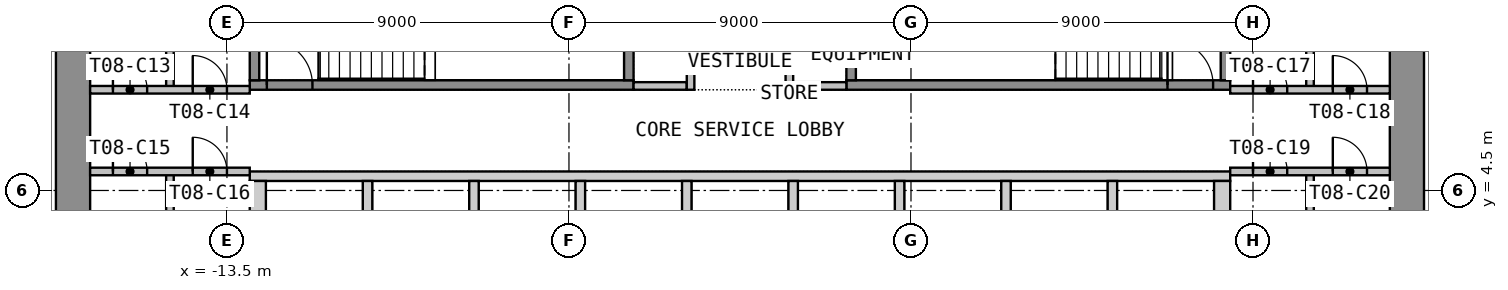
"""IFC4 building model, lengths in metres.
Left out: names, types, materials, properties, quantities, classifications, styles, units other than length and angle.
Written with IfcOpenShell. Run it as: python <this file> out.ifc"""

import sys

from ifc_helpers import new_model, si_unit, direction, frame, frame_2d, origin, place, context, subcontext, project, spatial, polyline, rectangle, outline, extrude, element, fill, save


model = new_model("IFC4")
c1 = context("Model", 3, precision=1e-05, world=origin(), true_north=direction((0.0, 1.0)))
c2 = subcontext(c1, "Body", "Model", "MODEL_VIEW")
j1 = project(units=[si_unit("LENGTHUNIT", "METRE"), si_unit("PLANEANGLEUNIT", "RADIAN")], contexts=[c1])
p1 = place(None, origin())
s1 = spatial("IfcSite", under=j1, at=p1, CompositionType="ELEMENT")
p2 = place(p1, origin())
s2 = spatial("IfcBuilding", under=s1, at=p2, CompositionType="ELEMENT")
p3 = place(p2, frame((0.0, 0.0, 116.4)))
s3 = spatial("IfcBuildingStorey", under=s2, at=p3, CompositionType="ELEMENT", Elevation=116.4)
p4 = place(p3, frame((-17.55, -12.6, 0.0), z_axis=(0.0, 0.0, 1.0), x_axis=(0.0, 1.0, 0.0)))
e1 = element("IfcWall", 1, at=p4, inside=s3, PredefinedType="SHEAR", context=c2, shape_type="SweptSolid", body=[
    extrude(rectangle(XDim=25.2, YDim=0.9, at=frame_2d((12.6, 0.0))), origin(), (0.0, 0.0, 1.0), 3.525),
])
p5 = place(p4, frame((11.4, 0.0, 0.0)))
e2 = element("IfcOpeningElement", 2, at=p5, cuts=e1, PredefinedType="OPENING", context=c2, shape_type="SweptSolid", body=[
    extrude(rectangle(XDim=2.4, YDim=2.1, at=frame_2d((1.2, 1.05))), frame((0.0, 0.46, 0.0), z_axis=(0.0, -1.0, 0.0), x_axis=(1.0, 0.0, 0.0)), (0.0, 0.0, 1.0), 0.92),
])
p6 = place(p3, frame((17.55, -12.6, 0.0), z_axis=(0.0, 0.0, 1.0), x_axis=(0.0, 1.0, 0.0)))
e3 = element("IfcWall", 3, at=p6, inside=s3, PredefinedType="SHEAR", context=c2, shape_type="SweptSolid", body=[
    extrude(rectangle(XDim=25.2, YDim=0.9, at=frame_2d((12.6, 0.0))), origin(), (0.0, 0.0, 1.0), 3.525),
])
p7 = place(p6, frame((11.4, 0.0, 0.0)))
e4 = element("IfcOpeningElement", 4, at=p7, cuts=e3, PredefinedType="OPENING", context=c2, shape_type="SweptSolid", body=[
    extrude(rectangle(XDim=2.4, YDim=2.1, at=frame_2d((1.2, 1.05))), frame((0.0, 0.46, 0.0), z_axis=(0.0, -1.0, 0.0), x_axis=(1.0, 0.0, 0.0)), (0.0, 0.0, 1.0), 0.92),
])
p8 = place(p3, origin())
e5 = element("IfcWall", 5, at=p8, inside=s3, PredefinedType="SHEAR", context=c2, shape_type="SweptSolid", body=[
    extrude(outline(polyline([(-12.9, 4.75), (12.9, 4.75), (12.9, 5.0), (-12.9, 5.0), (-12.9, 4.75)])), origin(), (0.0, 0.0, 1.0), 3.525),
])
p9 = place(p3, origin())
e6 = element("IfcWall", 6, at=p9, inside=s3, PredefinedType="SHEAR", context=c2, shape_type="SweptSolid", body=[
    extrude(outline(polyline([(-12.9, 2.05), (-12.475, 2.05), (-12.475, 4.75), (-12.9, 4.75), (-12.9, 2.05)])), origin(), (0.0, 0.0, 1.0), 3.525),
])
p10 = place(p3, origin())
e7 = element("IfcWall", 7, at=p10, inside=s3, PredefinedType="SHEAR", context=c2, shape_type="SweptSolid", body=[
    extrude(outline(polyline([(-9.925, 2.05), (-9.675, 2.05), (-9.675, 4.75), (-9.925, 4.75), (-9.925, 2.05)])), origin(), (0.0, 0.0, 1.0), 3.525),
])
p11 = place(p3, origin())
e8 = element("IfcWall", 8, at=p11, inside=s3, PredefinedType="SHEAR", context=c2, shape_type="SweptSolid", body=[
    extrude(outline(polyline([(-7.125, 2.05), (-6.875, 2.05), (-6.875, 4.75), (-7.125, 4.75), (-7.125, 2.05)])), origin(), (0.0, 0.0, 1.0), 3.525),
])
p12 = place(p3, origin())
e9 = element("IfcWall", 9, at=p12, inside=s3, PredefinedType="SHEAR", context=c2, shape_type="SweptSolid", body=[
    extrude(outline(polyline([(-4.325, 2.05), (-4.075, 2.05), (-4.075, 4.75), (-4.325, 4.75), (-4.325, 2.05)])), origin(), (0.0, 0.0, 1.0), 3.525),
])
p13 = place(p3, origin())
e10 = element("IfcWall", 10, at=p13, inside=s3, PredefinedType="SHEAR", context=c2, shape_type="SweptSolid", body=[
    extrude(outline(polyline([(-1.525, 2.05), (-1.275, 2.05), (-1.275, 4.75), (-1.525, 4.75), (-1.525, 2.05)])), origin(), (0.0, 0.0, 1.0), 3.525),
])
p14 = place(p3, origin())
e11 = element("IfcWall", 11, at=p14, inside=s3, PredefinedType="SHEAR", context=c2, shape_type="SweptSolid", body=[
    extrude(outline(polyline([(1.275, 2.05), (1.525, 2.05), (1.525, 4.75), (1.275, 4.75), (1.275, 2.05)])), origin(), (0.0, 0.0, 1.0), 3.525),
])
p15 = place(p3, origin())
e12 = element("IfcWall", 12, at=p15, inside=s3, PredefinedType="SHEAR", context=c2, shape_type="SweptSolid", body=[
    extrude(outline(polyline([(4.075, 2.05), (4.325, 2.05), (4.325, 4.75), (4.075, 4.75), (4.075, 2.05)])), origin(), (0.0, 0.0, 1.0), 3.525),
])
p16 = place(p3, origin())
e13 = element("IfcWall", 13, at=p16, inside=s3, PredefinedType="SHEAR", context=c2, shape_type="SweptSolid", body=[
    extrude(outline(polyline([(6.875, 2.05), (7.125, 2.05), (7.125, 4.75), (6.875, 4.75), (6.875, 2.05)])), origin(), (0.0, 0.0, 1.0), 3.525),
])
p17 = place(p3, origin())
e14 = element("IfcWall", 14, at=p17, inside=s3, PredefinedType="SHEAR", context=c2, shape_type="SweptSolid", body=[
    extrude(outline(polyline([(9.675, 2.05), (9.925, 2.05), (9.925, 4.75), (9.675, 4.75), (9.675, 2.05)])), origin(), (0.0, 0.0, 1.0), 3.525),
])
p18 = place(p3, origin())
e15 = element("IfcWall", 15, at=p18, inside=s3, PredefinedType="SHEAR", context=c2, shape_type="SweptSolid", body=[
    extrude(outline(polyline([(12.475, 2.05), (12.9, 2.05), (12.9, 4.75), (12.475, 4.75), (12.475, 2.05)])), origin(), (0.0, 0.0, 1.0), 3.525),
])
p19 = place(p3, frame((-12.9, 7.275, 0.0), z_axis=(0.0, 0.0, 1.0), x_axis=(1.0, 0.0, 0.0)))
e16 = element("IfcWall", 16, at=p19, inside=s3, PredefinedType="SHEAR", context=c2, shape_type="SweptSolid", body=[
    extrude(rectangle(XDim=10.1, YDim=0.25, at=frame_2d((5.05, 0.0))), origin(), (0.0, 0.0, 1.0), 3.525),
])
p20 = place(p19, frame((0.45, 0.0, 0.0)))
e17 = element("IfcOpeningElement", 17, at=p20, cuts=e16, PredefinedType="OPENING", context=c2, shape_type="SweptSolid", body=[
    extrude(rectangle(XDim=1.2, YDim=2.1, at=frame_2d((0.6, 1.05))), frame((0.0, 0.135, 0.0), z_axis=(0.0, -1.0, 0.0), x_axis=(1.0, 0.0, 0.0)), (0.0, 0.0, 1.0), 0.27),
])
for number, where, z_axis, x_axis in (
    (18, (-12.775, 7.4, 0.0), (0.0, 0.0, 1.0), (0.0, 1.0, 0.0)),
    (19, (-2.925, 7.4, 0.0), (0.0, 0.0, 1.0), (0.0, 1.0, 0.0)),
):
    element("IfcWall", number, at=place(p3, frame(where, z_axis=z_axis, x_axis=x_axis)), inside=s3, PredefinedType="SHEAR", context=c2, shape_type="SweptSolid", body=[
        extrude(rectangle(XDim=3.25, YDim=0.25, at=frame_2d((1.625, 0.0))), origin(), (0.0, 0.0, 1.0), 3.525),
    ])
p21 = place(p3, frame((2.8, 7.275, 0.0), z_axis=(0.0, 0.0, 1.0), x_axis=(1.0, 0.0, 0.0)))
e20 = element("IfcWall", 20, at=p21, inside=s3, PredefinedType="SHEAR", context=c2, shape_type="SweptSolid", body=[
    extrude(rectangle(XDim=10.1, YDim=0.25, at=frame_2d((5.05, 0.0))), origin(), (0.0, 0.0, 1.0), 3.525),
])
p22 = place(p21, frame((8.45, 0.0, 0.0)))
e21 = element("IfcOpeningElement", 21, at=p22, cuts=e20, PredefinedType="OPENING", context=c2, shape_type="SweptSolid", body=[
    extrude(rectangle(XDim=1.2, YDim=2.1, at=frame_2d((0.6, 1.05))), frame((0.0, 0.135, 0.0), z_axis=(0.0, -1.0, 0.0), x_axis=(1.0, 0.0, 0.0)), (0.0, 0.0, 1.0), 0.27),
])
for number, where, z_axis, x_axis in (
    (22, (2.925, 7.4, 0.0), (0.0, 0.0, 1.0), (0.0, 1.0, 0.0)),
    (23, (12.775, 7.4, 0.0), (0.0, 0.0, 1.0), (0.0, 1.0, 0.0)),
):
    element("IfcWall", number, at=place(p3, frame(where, z_axis=z_axis, x_axis=x_axis)), inside=s3, PredefinedType="SHEAR", context=c2, shape_type="SweptSolid", body=[
        extrude(rectangle(XDim=3.25, YDim=0.25, at=frame_2d((1.625, 0.0))), origin(), (0.0, 0.0, 1.0), 3.525),
    ])
for number, where, z_axis, x_axis in (
    (24, (-2.8, 7.25, 0.0), (0.0, 0.0, 1.0), (1.0, 0.0, 0.0)),
    (25, (1.4, 7.25, 0.0), (0.0, 0.0, 1.0), (1.0, 0.0, 0.0)),
):
    element("IfcWall", number, at=place(p3, frame(where, z_axis=z_axis, x_axis=x_axis)), inside=s3, PredefinedType="PARTITIONING", context=c2, shape_type="SweptSolid", body=[
        extrude(rectangle(XDim=1.4, YDim=0.2, at=frame_2d((0.7, 0.0))), origin(), (0.0, 0.0, 1.0), 3.525),
    ])
p23 = place(p3, frame((-1.3, 7.15, 0.0), z_axis=(0.0, 0.0, 1.0), x_axis=(0.0, 1.0, 0.0)))
e26 = element("IfcWall", 26, at=p23, inside=s3, PredefinedType="PARTITIONING", context=c2, shape_type="SweptSolid", body=[
    extrude(rectangle(XDim=5.45, YDim=0.2, at=frame_2d((2.725, 0.0))), origin(), (0.0, 0.0, 1.0), 3.525),
])
p24 = place(p23, frame((2.375, 0.0, 0.0)))
e27 = element("IfcOpeningElement", 27, at=p24, cuts=e26, PredefinedType="OPENING", context=c2, shape_type="SweptSolid", body=[
    extrude(rectangle(XDim=0.9, YDim=2.1, at=frame_2d((0.45, 1.05))), frame((0.0, 0.11, 0.0), z_axis=(0.0, -1.0, 0.0), x_axis=(1.0, 0.0, 0.0)), (0.0, 0.0, 1.0), 0.22),
])
p25 = place(p3, frame((1.3, 7.15, 0.0), z_axis=(0.0, 0.0, 1.0), x_axis=(0.0, 1.0, 0.0)))
e28 = element("IfcWall", 28, at=p25, inside=s3, PredefinedType="PARTITIONING", context=c2, shape_type="SweptSolid", body=[
    extrude(rectangle(XDim=5.45, YDim=0.2, at=frame_2d((2.725, 0.0))), origin(), (0.0, 0.0, 1.0), 3.525),
])
p26 = place(p25, frame((1.587, 0.0, 0.0)))
e29 = element("IfcOpeningElement", 29, at=p26, cuts=e28, PredefinedType="OPENING", context=c2, shape_type="SweptSolid", body=[
    extrude(rectangle(XDim=0.9, YDim=2.1, at=frame_2d((0.45, 1.05))), frame((0.0, 0.11, 0.0), z_axis=(0.0, -1.0, 0.0), x_axis=(1.0, 0.0, 0.0)), (0.0, 0.0, 1.0), 0.22),
])
p27 = place(p25, frame((4.212, 0.0, 0.0)))
e30 = element("IfcOpeningElement", 30, at=p27, cuts=e28, PredefinedType="OPENING", context=c2, shape_type="SweptSolid", body=[
    extrude(rectangle(XDim=0.9, YDim=2.1, at=frame_2d((0.45, 1.05))), frame((0.0, 0.11, 0.0), z_axis=(0.0, -1.0, 0.0), x_axis=(1.0, 0.0, 0.0)), (0.0, 0.0, 1.0), 0.22),
])
p28 = place(p3, frame((-15.0, 7.15, 0.0), z_axis=(0.0, 0.0, 1.0), x_axis=(0.0, 1.0, 0.0)))
e31 = element("IfcWall", 31, at=p28, inside=s3, PredefinedType="PARTITIONING", context=c2, shape_type="SweptSolid", body=[
    extrude(rectangle(XDim=5.45, YDim=0.2, at=frame_2d((2.725, 0.0))), origin(), (0.0, 0.0, 1.0), 3.525),
])
p29 = place(p3, frame((-17.1, 7.15, 0.0), z_axis=(0.0, 0.0, 1.0), x_axis=(1.0, 0.0, 0.0)))
e32 = element("IfcWall", 32, at=p29, inside=s3, PredefinedType="PARTITIONING", context=c2, shape_type="SweptSolid", body=[
    extrude(rectangle(XDim=4.2, YDim=0.2, at=frame_2d((2.1, 0.0))), origin(), (0.0, 0.0, 1.0), 3.525),
])
p30 = place(p29, frame((0.6, 0.0, 0.0)))
e33 = element("IfcOpeningElement", 33, at=p30, cuts=e32, PredefinedType="OPENING", context=c2, shape_type="SweptSolid", body=[
    extrude(rectangle(XDim=0.9, YDim=2.1, at=frame_2d((0.45, 1.05))), frame((0.0, 0.11, 0.0), z_axis=(0.0, -1.0, 0.0), x_axis=(1.0, 0.0, 0.0)), (0.0, 0.0, 1.0), 0.22),
])
p31 = place(p29, frame((2.7, 0.0, 0.0)))
e34 = element("IfcOpeningElement", 34, at=p31, cuts=e32, PredefinedType="OPENING", context=c2, shape_type="SweptSolid", body=[
    extrude(rectangle(XDim=0.9, YDim=2.1, at=frame_2d((0.45, 1.05))), frame((0.0, 0.11, 0.0), z_axis=(0.0, -1.0, 0.0), x_axis=(1.0, 0.0, 0.0)), (0.0, 0.0, 1.0), 0.22),
])
p32 = place(p3, frame((-15.0, 1.8, 0.0), z_axis=(0.0, 0.0, 1.0), x_axis=(0.0, 1.0, 0.0)))
e35 = element("IfcWall", 35, at=p32, inside=s3, PredefinedType="PARTITIONING", context=c2, shape_type="SweptSolid", body=[
    extrude(rectangle(XDim=3.2, YDim=0.2, at=frame_2d((1.6, 0.0))), origin(), (0.0, 0.0, 1.0), 3.525),
])
p33 = place(p3, frame((-17.1, 5.0, 0.0), z_axis=(0.0, 0.0, 1.0), x_axis=(1.0, 0.0, 0.0)))
e36 = element("IfcWall", 36, at=p33, inside=s3, PredefinedType="PARTITIONING", context=c2, shape_type="SweptSolid", body=[
    extrude(rectangle(XDim=4.2, YDim=0.2, at=frame_2d((2.1, 0.0))), origin(), (0.0, 0.0, 1.0), 3.525),
])
p34 = place(p33, frame((0.6, 0.0, 0.0)))
e37 = element("IfcOpeningElement", 37, at=p34, cuts=e36, PredefinedType="OPENING", context=c2, shape_type="SweptSolid", body=[
    extrude(rectangle(XDim=0.9, YDim=2.1, at=frame_2d((0.45, 1.05))), frame((0.0, 0.11, 0.0), z_axis=(0.0, -1.0, 0.0), x_axis=(1.0, 0.0, 0.0)), (0.0, 0.0, 1.0), 0.22),
])
p35 = place(p33, frame((2.7, 0.0, 0.0)))
e38 = element("IfcOpeningElement", 38, at=p35, cuts=e36, PredefinedType="OPENING", context=c2, shape_type="SweptSolid", body=[
    extrude(rectangle(XDim=0.9, YDim=2.1, at=frame_2d((0.45, 1.05))), frame((0.0, 0.11, 0.0), z_axis=(0.0, -1.0, 0.0), x_axis=(1.0, 0.0, 0.0)), (0.0, 0.0, 1.0), 0.22),
])
p36 = place(p3, frame((15.0, 7.15, 0.0), z_axis=(0.0, 0.0, 1.0), x_axis=(0.0, 1.0, 0.0)))
e39 = element("IfcWall", 39, at=p36, inside=s3, PredefinedType="PARTITIONING", context=c2, shape_type="SweptSolid", body=[
    extrude(rectangle(XDim=5.45, YDim=0.2, at=frame_2d((2.725, 0.0))), origin(), (0.0, 0.0, 1.0), 3.525),
])
p37 = place(p3, frame((12.9, 7.15, 0.0), z_axis=(0.0, 0.0, 1.0), x_axis=(1.0, 0.0, 0.0)))
e40 = element("IfcWall", 40, at=p37, inside=s3, PredefinedType="PARTITIONING", context=c2, shape_type="SweptSolid", body=[
    extrude(rectangle(XDim=4.2, YDim=0.2, at=frame_2d((2.1, 0.0))), origin(), (0.0, 0.0, 1.0), 3.525),
])
p38 = place(p37, frame((0.6, 0.0, 0.0)))
e41 = element("IfcOpeningElement", 41, at=p38, cuts=e40, PredefinedType="OPENING", context=c2, shape_type="SweptSolid", body=[
    extrude(rectangle(XDim=0.9, YDim=2.1, at=frame_2d((0.45, 1.05))), frame((0.0, 0.11, 0.0), z_axis=(0.0, -1.0, 0.0), x_axis=(1.0, 0.0, 0.0)), (0.0, 0.0, 1.0), 0.22),
])
p39 = place(p37, frame((2.7, 0.0, 0.0)))
e42 = element("IfcOpeningElement", 42, at=p39, cuts=e40, PredefinedType="OPENING", context=c2, shape_type="SweptSolid", body=[
    extrude(rectangle(XDim=0.9, YDim=2.1, at=frame_2d((0.45, 1.05))), frame((0.0, 0.11, 0.0), z_axis=(0.0, -1.0, 0.0), x_axis=(1.0, 0.0, 0.0)), (0.0, 0.0, 1.0), 0.22),
])
p40 = place(p3, frame((15.0, 1.8, 0.0), z_axis=(0.0, 0.0, 1.0), x_axis=(0.0, 1.0, 0.0)))
e43 = element("IfcWall", 43, at=p40, inside=s3, PredefinedType="PARTITIONING", context=c2, shape_type="SweptSolid", body=[
    extrude(rectangle(XDim=3.2, YDim=0.2, at=frame_2d((1.6, 0.0))), origin(), (0.0, 0.0, 1.0), 3.525),
])
p41 = place(p3, frame((12.9, 5.0, 0.0), z_axis=(0.0, 0.0, 1.0), x_axis=(1.0, 0.0, 0.0)))
e44 = element("IfcWall", 44, at=p41, inside=s3, PredefinedType="PARTITIONING", context=c2, shape_type="SweptSolid", body=[
    extrude(rectangle(XDim=4.2, YDim=0.2, at=frame_2d((2.1, 0.0))), origin(), (0.0, 0.0, 1.0), 3.525),
])
p42 = place(p41, frame((0.6, 0.0, 0.0)))
e45 = element("IfcOpeningElement", 45, at=p42, cuts=e44, PredefinedType="OPENING", context=c2, shape_type="SweptSolid", body=[
    extrude(rectangle(XDim=0.9, YDim=2.1, at=frame_2d((0.45, 1.05))), frame((0.0, 0.11, 0.0), z_axis=(0.0, -1.0, 0.0), x_axis=(1.0, 0.0, 0.0)), (0.0, 0.0, 1.0), 0.22),
])
p43 = place(p41, frame((2.7, 0.0, 0.0)))
e46 = element("IfcOpeningElement", 46, at=p43, cuts=e44, PredefinedType="OPENING", context=c2, shape_type="SweptSolid", body=[
    extrude(rectangle(XDim=0.9, YDim=2.1, at=frame_2d((0.45, 1.05))), frame((0.0, 0.11, 0.0), z_axis=(0.0, -1.0, 0.0), x_axis=(1.0, 0.0, 0.0)), (0.0, 0.0, 1.0), 0.22),
])
p44 = place(p20, origin())
e47 = element("IfcDoor", 47, at=p44, inside=s3, OperationType="SINGLE_SWING_LEFT", PredefinedType="DOOR", context=c2, shape_type="SweptSolid", body=[
    extrude(rectangle(XDim=1.2, YDim=2.1, at=frame_2d((0.6, 1.05))), frame((0.0, 0.025, 0.0), z_axis=(0.0, -1.0, 0.0), x_axis=(1.0, 0.0, 0.0)), (0.0, 0.0, 1.0), 0.05),
])
fill(e17, e47)
p45 = place(p22, origin())
e48 = element("IfcDoor", 48, at=p45, inside=s3, OperationType="SINGLE_SWING_LEFT", PredefinedType="DOOR", context=c2, shape_type="SweptSolid", body=[
    extrude(rectangle(XDim=1.2, YDim=2.1, at=frame_2d((0.6, 1.05))), frame((0.0, 0.025, 0.0), z_axis=(0.0, -1.0, 0.0), x_axis=(1.0, 0.0, 0.0)), (0.0, 0.0, 1.0), 0.05),
])
fill(e21, e48)
p46 = place(p30, origin())
e49 = element("IfcDoor", 49, at=p46, inside=s3, OperationType="SINGLE_SWING_LEFT", PredefinedType="DOOR", context=c2, shape_type="SweptSolid", body=[
    extrude(rectangle(XDim=0.9, YDim=2.1, at=frame_2d((0.45, 1.05))), frame((0.0, 0.025, 0.0), z_axis=(0.0, -1.0, 0.0), x_axis=(1.0, 0.0, 0.0)), (0.0, 0.0, 1.0), 0.05),
])
fill(e33, e49)
p47 = place(p31, origin())
e50 = element("IfcDoor", 50, at=p47, inside=s3, OperationType="SINGLE_SWING_LEFT", PredefinedType="DOOR", context=c2, shape_type="SweptSolid", body=[
    extrude(rectangle(XDim=0.9, YDim=2.1, at=frame_2d((0.45, 1.05))), frame((0.0, 0.025, 0.0), z_axis=(0.0, -1.0, 0.0), x_axis=(1.0, 0.0, 0.0)), (0.0, 0.0, 1.0), 0.05),
])
fill(e34, e50)
p48 = place(p34, origin())
e51 = element("IfcDoor", 51, at=p48, inside=s3, OperationType="SINGLE_SWING_LEFT", PredefinedType="DOOR", context=c2, shape_type="SweptSolid", body=[
    extrude(rectangle(XDim=0.9, YDim=2.1, at=frame_2d((0.45, 1.05))), frame((0.0, 0.025, 0.0), z_axis=(0.0, -1.0, 0.0), x_axis=(1.0, 0.0, 0.0)), (0.0, 0.0, 1.0), 0.05),
])
fill(e37, e51)
p49 = place(p35, origin())
e52 = element("IfcDoor", 52, at=p49, inside=s3, OperationType="SINGLE_SWING_LEFT", PredefinedType="DOOR", context=c2, shape_type="SweptSolid", body=[
    extrude(rectangle(XDim=0.9, YDim=2.1, at=frame_2d((0.45, 1.05))), frame((0.0, 0.025, 0.0), z_axis=(0.0, -1.0, 0.0), x_axis=(1.0, 0.0, 0.0)), (0.0, 0.0, 1.0), 0.05),
])
fill(e38, e52)
p50 = place(p38, origin())
e53 = element("IfcDoor", 53, at=p50, inside=s3, OperationType="SINGLE_SWING_LEFT", PredefinedType="DOOR", context=c2, shape_type="SweptSolid", body=[
    extrude(rectangle(XDim=0.9, YDim=2.1, at=frame_2d((0.45, 1.05))), frame((0.0, 0.025, 0.0), z_axis=(0.0, -1.0, 0.0), x_axis=(1.0, 0.0, 0.0)), (0.0, 0.0, 1.0), 0.05),
])
fill(e41, e53)
p51 = place(p39, origin())
e54 = element("IfcDoor", 54, at=p51, inside=s3, OperationType="SINGLE_SWING_LEFT", PredefinedType="DOOR", context=c2, shape_type="SweptSolid", body=[
    extrude(rectangle(XDim=0.9, YDim=2.1, at=frame_2d((0.45, 1.05))), frame((0.0, 0.025, 0.0), z_axis=(0.0, -1.0, 0.0), x_axis=(1.0, 0.0, 0.0)), (0.0, 0.0, 1.0), 0.05),
])
fill(e42, e54)
p52 = place(p42, origin())
e55 = element("IfcDoor", 55, at=p52, inside=s3, OperationType="SINGLE_SWING_LEFT", PredefinedType="DOOR", context=c2, shape_type="SweptSolid", body=[
    extrude(rectangle(XDim=0.9, YDim=2.1, at=frame_2d((0.45, 1.05))), frame((0.0, 0.025, 0.0), z_axis=(0.0, -1.0, 0.0), x_axis=(1.0, 0.0, 0.0)), (0.0, 0.0, 1.0), 0.05),
])
fill(e45, e55)
p53 = place(p43, origin())
e56 = element("IfcDoor", 56, at=p53, inside=s3, OperationType="SINGLE_SWING_LEFT", PredefinedType="DOOR", context=c2, shape_type="SweptSolid", body=[
    extrude(rectangle(XDim=0.9, YDim=2.1, at=frame_2d((0.45, 1.05))), frame((0.0, 0.025, 0.0), z_axis=(0.0, -1.0, 0.0), x_axis=(1.0, 0.0, 0.0)), (0.0, 0.0, 1.0), 0.05),
])
fill(e46, e56)
save(model, sys.argv[1])
